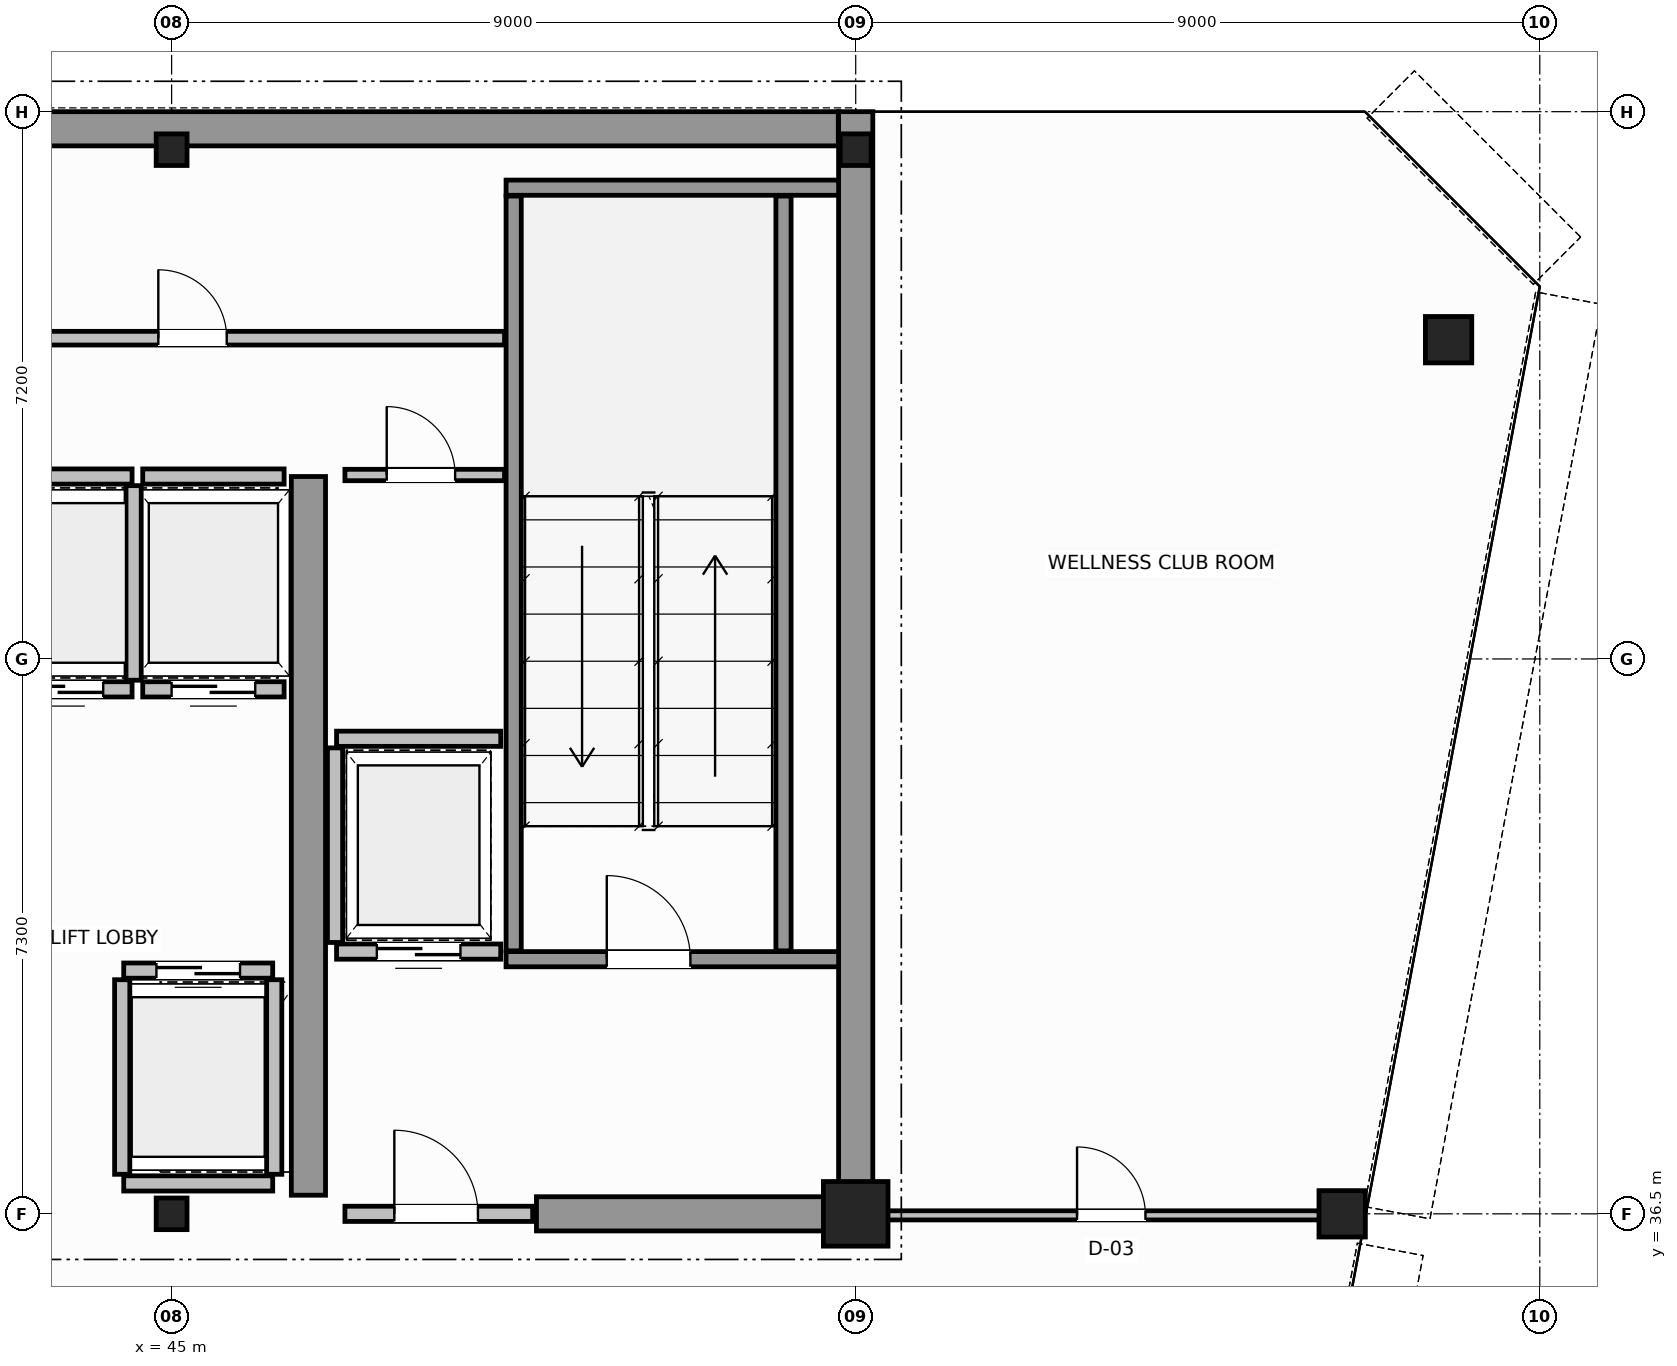
"""IFC4 building model, lengths in metres.
Left out: names, types, materials, properties, quantities, classifications, styles, units other than length and angle.
Written with IfcOpenShell. Run it as: python <this file> out.ifc"""

import sys

from ifc_helpers import new_model, si_unit, direction, frame, frame_2d, origin, origin_2d, place, context, subcontext, project, spatial, rectangle, hollow_circle, i_section, extrude, source, transform, mapped, element, fill, save


model = new_model("IFC4")
c1 = context("Model", 3, precision=1e-05, world=origin(), true_north=direction((0.0, 1.0)))
c2 = subcontext(c1, "Body", "Model", "MODEL_VIEW")
j1 = project(units=[si_unit("LENGTHUNIT", "METRE"), si_unit("PLANEANGLEUNIT", "RADIAN")], contexts=[c1])
p1 = place(None, origin())
s1 = spatial("IfcSite", under=j1, at=p1, CompositionType="ELEMENT")
p2 = place(p1, origin())
s2 = spatial("IfcBuilding", under=s1, at=p2, CompositionType="ELEMENT")
p3 = place(p2, frame((0.0, 0.0, 299.2)))
s3 = spatial("IfcBuildingStorey", under=s2, at=p3, CompositionType="ELEMENT", Elevation=299.2)
m1 = source(origin(), c2, "Body", "SweptSolid", [
    extrude(i_section(OverallWidth=0.406, OverallDepth=0.416, WebThickness=0.03, FlangeThickness=0.042, FilletRadius=0.015, at=origin_2d()), origin(), (0.0, 0.0, 1.0), 4.6),
])
p4 = place(p3, frame((45.0, 36.5, 0.0), z_axis=(0.0, 0.0, 1.0), x_axis=(1.0, 0.0, 0.0)))
e1 = element("IfcColumn", 1, at=p4, inside=s3, PredefinedType="COLUMN", context=c2, shape_type="MappedRepresentation", body=[
    mapped(m1, transform((0.0, 0.0, 0.0), scale=1.0)),
])
m2 = source(origin(), c2, "Body", "SweptSolid", [
    extrude(rectangle(XDim=0.85, YDim=0.85, at=origin_2d()), origin(), (0.0, 0.0, 1.0), 4.6),
])
p5 = place(p3, frame((54.0, 36.5, 0.0), z_axis=(0.0, 0.0, 1.0), x_axis=(1.0, 0.0, 0.0)))
e2 = element("IfcColumn", 2, at=p5, inside=s3, PredefinedType="COLUMN", context=c2, shape_type="MappedRepresentation", body=[
    mapped(m2, transform((0.0, 0.0, 0.0), scale=1.0)),
])
for number, where, z_axis, x_axis in (
    (3, (45.0, 50.5, 0.0), (0.0, 0.0, 1.0), (1.0, 0.0, 0.0)),
    (4, (54.0, 50.5, 0.0), (0.0, 0.0, 1.0), (1.0, 0.0, 0.0)),
):
    element("IfcColumn", number, at=place(p3, frame(where, z_axis=z_axis, x_axis=x_axis)), inside=s3, PredefinedType="COLUMN", context=c2, shape_type="MappedRepresentation", body=[
        mapped(m1, transform((0.0, 0.0, 0.0), scale=1.0)),
    ])
m3 = source(origin(), c2, "Body", "SweptSolid", [
    extrude(hollow_circle(Radius=0.305, WallThickness=0.03, at=origin_2d()), origin(), (0.0, 0.0, 1.0), 4.6),
])
for number, where, z_axis, x_axis in (
    (5, (61.8, 48.0, 0.0), (0.0, 0.0, 1.0), (1.0, 0.0, 0.0)),
    (6, (60.4, 36.5, 0.0), (0.0, 0.0, 1.0), (1.0, 0.0, 0.0)),
):
    element("IfcColumn", number, at=place(p3, frame(where, z_axis=z_axis, x_axis=x_axis)), inside=s3, PredefinedType="COLUMN", context=c2, shape_type="MappedRepresentation", body=[
        mapped(m3, transform((0.0, 0.0, 0.0), scale=1.0)),
    ])
p6 = place(p3, frame((34.002, 50.775, 0.0), z_axis=(0.0, 0.0, 1.0), x_axis=(1.0, 0.0, 0.0)))
e7 = element("IfcWall", 7, at=p6, inside=s3, PredefinedType="SHEAR", context=c2, shape_type="SweptSolid", body=[
    extrude(rectangle(XDim=19.769, YDim=0.45, at=frame_2d((9.885, 0.0))), origin(), (0.0, 0.0, 1.0), 4.6),
])
p7 = place(p3, frame((54.0, 36.5, 0.0), z_axis=(0.0, 0.0, 1.0), x_axis=(0.0, 1.0, 0.0)))
e8 = element("IfcWall", 8, at=p7, inside=s3, PredefinedType="SHEAR", context=c2, shape_type="SweptSolid", body=[
    extrude(rectangle(XDim=14.5, YDim=0.45, at=frame_2d((7.25, 0.0))), origin(), (0.0, 0.0, 1.0), 4.6),
])
p8 = place(p3, frame((49.8, 36.5, 0.0), z_axis=(0.0, 0.0, 1.0), x_axis=(1.0, 0.0, 0.0)))
e9 = element("IfcWall", 9, at=p8, inside=s3, PredefinedType="SHEAR", context=c2, shape_type="SweptSolid", body=[
    extrude(rectangle(XDim=3.955, YDim=0.45, at=frame_2d((1.978, 0.0))), origin(), (0.0, 0.0, 1.0), 3.3),
])
p9 = place(p3, frame((46.8, 36.745, 0.0), z_axis=(0.0, 0.0, 1.0), x_axis=(0.0, 1.0, 0.0)))
e10 = element("IfcWall", 10, at=p9, inside=s3, PredefinedType="SHEAR", context=c2, shape_type="SweptSolid", body=[
    extrude(rectangle(XDim=9.455, YDim=0.45, at=frame_2d((4.728, 0.0))), origin(), (0.0, 0.0, 1.0), 4.6),
])
p10 = place(p3, frame((49.4, 39.85, 0.0), z_axis=(0.0, 0.0, 1.0), x_axis=(1.0, 0.0, 0.0)))
e11 = element("IfcWall", 11, at=p10, inside=s3, PredefinedType="SOLIDWALL", context=c2, shape_type="SweptSolid", body=[
    extrude(rectangle(XDim=4.375, YDim=0.2, at=frame_2d((2.188, 0.0))), origin(), (0.0, 0.0, 1.0), 4.6),
])
p11 = place(p10, frame((1.325, 0.0, 0.0)))
e12 = element("IfcOpeningElement", 12, at=p11, cuts=e11, PredefinedType="OPENING", context=c2, shape_type="SweptSolid", body=[
    extrude(rectangle(XDim=1.1, YDim=2.15, at=frame_2d((0.55, 1.075))), frame((0.0, 0.11, 0.0), z_axis=(0.0, -1.0, 0.0), x_axis=(1.0, 0.0, 0.0)), (0.0, 0.0, 1.0), 0.22),
])
p12 = place(p3, frame((49.4, 50.0, 0.0), z_axis=(0.0, 0.0, 1.0), x_axis=(1.0, 0.0, 0.0)))
e13 = element("IfcWall", 13, at=p12, inside=s3, PredefinedType="SOLIDWALL", context=c2, shape_type="SweptSolid", body=[
    extrude(rectangle(XDim=4.375, YDim=0.2, at=frame_2d((2.188, 0.0))), origin(), (0.0, 0.0, 1.0), 4.6),
])
for number, where, z_axis, x_axis in (
    (14, (49.5, 39.96, 0.0), (0.0, 0.0, 1.0), (0.0, 1.0, 0.0)),
    (15, (53.05, 39.96, 0.0), (0.0, 0.0, 1.0), (0.0, 1.0, 0.0)),
):
    element("IfcWall", number, at=place(p3, frame(where, z_axis=z_axis, x_axis=x_axis)), inside=s3, PredefinedType="SOLIDWALL", context=c2, shape_type="SweptSolid", body=[
        extrude(rectangle(XDim=9.93, YDim=0.2, at=frame_2d((4.965, 0.0))), origin(), (0.0, 0.0, 1.0), 4.6),
    ])
p13 = place(p3, frame((47.28, 36.5, 0.0), z_axis=(0.0, 0.0, 1.0), x_axis=(1.0, 0.0, 0.0)))
e16 = element("IfcWall", 16, at=p13, inside=s3, PredefinedType="SOLIDWALL", context=c2, shape_type="SweptSolid", body=[
    extrude(rectangle(XDim=2.47, YDim=0.2, at=frame_2d((1.235, 0.0))), origin(), (0.0, 0.0, 1.0), 3.29),
])
p14 = place(p13, frame((0.65, 0.0, 0.0)))
e17 = element("IfcOpeningElement", 17, at=p14, cuts=e16, PredefinedType="OPENING", context=c2, shape_type="SweptSolid", body=[
    extrude(rectangle(XDim=1.1, YDim=2.15, at=frame_2d((0.55, 1.075))), frame((0.0, 0.11, 0.0), z_axis=(0.0, -1.0, 0.0), x_axis=(1.0, 0.0, 0.0)), (0.0, 0.0, 1.0), 0.22),
])
p15 = place(p3, frame((44.37, 39.7, 0.0), z_axis=(0.0, 0.0, 1.0), x_axis=(1.0, 0.0, 0.0)))
e18 = element("IfcWall", 18, at=p15, inside=s3, PredefinedType="SOLIDWALL", context=c2, shape_type="SweptSolid", body=[
    extrude(rectangle(XDim=1.96, YDim=0.2, at=frame_2d((0.98, 0.0))), origin(), (0.0, 0.0, 1.0), 4.3),
])
p16 = place(p15, frame((0.43, 0.0, 0.0)))
e19 = element("IfcOpeningElement", 19, at=p16, cuts=e18, PredefinedType="OPENING", context=c2, shape_type="SweptSolid", body=[
    extrude(rectangle(XDim=1.1, YDim=2.15, at=frame_2d((0.55, 1.075))), frame((0.0, 0.11, 0.0), z_axis=(0.0, -1.0, 0.0), x_axis=(1.0, 0.0, 0.0)), (0.0, 0.0, 1.0), 0.22),
])
p17 = place(p3, frame((44.37, 36.9, 0.0), z_axis=(0.0, 0.0, 1.0), x_axis=(1.0, 0.0, 0.0)))
e20 = element("IfcWall", 20, at=p17, inside=s3, PredefinedType="SOLIDWALL", context=c2, shape_type="SweptSolid", body=[
    extrude(rectangle(XDim=1.96, YDim=0.2, at=frame_2d((0.98, 0.0))), origin(), (0.0, 0.0, 1.0), 3.09),
])
for number, where, z_axis, x_axis in (
    (21, (44.35, 37.02, 0.0), (0.0, 0.0, 1.0), (0.0, 1.0, 0.0)),
    (22, (46.35, 37.02, 0.0), (0.0, 0.0, 1.0), (0.0, 1.0, 0.0)),
):
    element("IfcWall", number, at=place(p3, frame(where, z_axis=z_axis, x_axis=x_axis)), inside=s3, PredefinedType="SOLIDWALL", context=c2, shape_type="SweptSolid", body=[
        extrude(rectangle(XDim=2.56, YDim=0.2, at=frame_2d((1.28, 0.0))), origin(), (0.0, 0.0, 1.0), 4.3),
    ])
p18 = place(p3, frame((42.62, 43.4, 0.0), z_axis=(0.0, 0.0, 1.0), x_axis=(1.0, 0.0, 0.0)))
e23 = element("IfcWall", 23, at=p18, inside=s3, PredefinedType="SOLIDWALL", context=c2, shape_type="SweptSolid", body=[
    extrude(rectangle(XDim=1.86, YDim=0.2, at=frame_2d((0.93, 0.0))), origin(), (0.0, 0.0, 1.0), 4.3),
])
p19 = place(p18, frame((0.38, 0.0, 0.0)))
e24 = element("IfcOpeningElement", 24, at=p19, cuts=e23, PredefinedType="OPENING", context=c2, shape_type="SweptSolid", body=[
    extrude(rectangle(XDim=1.1, YDim=2.15, at=frame_2d((0.55, 1.075))), frame((0.0, 0.11, 0.0), z_axis=(0.0, -1.0, 0.0), x_axis=(1.0, 0.0, 0.0)), (0.0, 0.0, 1.0), 0.22),
])
p20 = place(p3, frame((42.62, 46.2, 0.0), z_axis=(0.0, 0.0, 1.0), x_axis=(1.0, 0.0, 0.0)))
e25 = element("IfcWall", 25, at=p20, inside=s3, PredefinedType="SOLIDWALL", context=c2, shape_type="SweptSolid", body=[
    extrude(rectangle(XDim=1.86, YDim=0.2, at=frame_2d((0.93, 0.0))), origin(), (0.0, 0.0, 1.0), 4.3),
])
p21 = place(p3, frame((44.5, 43.52, 0.0), z_axis=(0.0, 0.0, 1.0), x_axis=(0.0, 1.0, 0.0)))
e26 = element("IfcWall", 26, at=p21, inside=s3, PredefinedType="SOLIDWALL", context=c2, shape_type="SweptSolid", body=[
    extrude(rectangle(XDim=2.56, YDim=0.2, at=frame_2d((1.28, 0.0))), origin(), (0.0, 0.0, 1.0), 3.09),
])
p22 = place(p3, frame((44.62, 43.4, 0.0), z_axis=(0.0, 0.0, 1.0), x_axis=(1.0, 0.0, 0.0)))
e27 = element("IfcWall", 27, at=p22, inside=s3, PredefinedType="SOLIDWALL", context=c2, shape_type="SweptSolid", body=[
    extrude(rectangle(XDim=1.86, YDim=0.2, at=frame_2d((0.93, 0.0))), origin(), (0.0, 0.0, 1.0), 4.3),
])
p23 = place(p22, frame((0.38, 0.0, 0.0)))
e28 = element("IfcOpeningElement", 28, at=p23, cuts=e27, PredefinedType="OPENING", context=c2, shape_type="SweptSolid", body=[
    extrude(rectangle(XDim=1.1, YDim=2.15, at=frame_2d((0.55, 1.075))), frame((0.0, 0.11, 0.0), z_axis=(0.0, -1.0, 0.0), x_axis=(1.0, 0.0, 0.0)), (0.0, 0.0, 1.0), 0.22),
])
p24 = place(p3, frame((44.62, 46.2, 0.0), z_axis=(0.0, 0.0, 1.0), x_axis=(1.0, 0.0, 0.0)))
e29 = element("IfcWall", 29, at=p24, inside=s3, PredefinedType="SOLIDWALL", context=c2, shape_type="SweptSolid", body=[
    extrude(rectangle(XDim=1.86, YDim=0.2, at=frame_2d((0.93, 0.0))), origin(), (0.0, 0.0, 1.0), 4.3),
])
p25 = place(p3, frame((47.17, 39.95, 0.0), z_axis=(0.0, 0.0, 1.0), x_axis=(1.0, 0.0, 0.0)))
e30 = element("IfcWall", 30, at=p25, inside=s3, PredefinedType="SOLIDWALL", context=c2, shape_type="SweptSolid", body=[
    extrude(rectangle(XDim=2.16, YDim=0.2, at=frame_2d((1.08, 0.0))), origin(), (0.0, 0.0, 1.0), 4.3),
])
p26 = place(p25, frame((0.53, 0.0, 0.0)))
e31 = element("IfcOpeningElement", 31, at=p26, cuts=e30, PredefinedType="OPENING", context=c2, shape_type="SweptSolid", body=[
    extrude(rectangle(XDim=1.1, YDim=2.15, at=frame_2d((0.55, 1.075))), frame((0.0, 0.11, 0.0), z_axis=(0.0, -1.0, 0.0), x_axis=(1.0, 0.0, 0.0)), (0.0, 0.0, 1.0), 0.22),
])
p27 = place(p3, frame((47.17, 42.75, 0.0), z_axis=(0.0, 0.0, 1.0), x_axis=(1.0, 0.0, 0.0)))
e32 = element("IfcWall", 32, at=p27, inside=s3, PredefinedType="SOLIDWALL", context=c2, shape_type="SweptSolid", body=[
    extrude(rectangle(XDim=2.16, YDim=0.2, at=frame_2d((1.08, 0.0))), origin(), (0.0, 0.0, 1.0), 4.3),
])
p28 = place(p3, frame((47.15, 40.07, 0.0), z_axis=(0.0, 0.0, 1.0), x_axis=(0.0, 1.0, 0.0)))
e33 = element("IfcWall", 33, at=p28, inside=s3, PredefinedType="SOLIDWALL", context=c2, shape_type="SweptSolid", body=[
    extrude(rectangle(XDim=2.56, YDim=0.2, at=frame_2d((1.28, 0.0))), origin(), (0.0, 0.0, 1.0), 4.3),
])
p29 = place(p3, frame((47.28, 46.22, 0.0), z_axis=(0.0, 0.0, 1.0), x_axis=(1.0, 0.0, 0.0)))
e34 = element("IfcWall", 34, at=p29, inside=s3, PredefinedType="PARTITIONING", context=c2, shape_type="SweptSolid", body=[
    extrude(rectangle(XDim=2.1, YDim=0.15, at=frame_2d((1.05, 0.0))), origin(), (0.0, 0.0, 1.0), 4.3),
])
p30 = place(p29, frame((0.55, 0.0, 0.0)))
e35 = element("IfcOpeningElement", 35, at=p30, cuts=e34, PredefinedType="OPENING", context=c2, shape_type="SweptSolid", body=[
    extrude(rectangle(XDim=0.9, YDim=2.1, at=frame_2d((0.45, 1.05))), frame((0.0, 0.085, 0.0), z_axis=(0.0, -1.0, 0.0), x_axis=(1.0, 0.0, 0.0)), (0.0, 0.0, 1.0), 0.17),
])
p31 = place(p3, frame((18.62, 48.02, 0.0), z_axis=(0.0, 0.0, 1.0), x_axis=(1.0, 0.0, 0.0)))
e36 = element("IfcWall", 36, at=p31, inside=s3, PredefinedType="PLUMBINGWALL", context=c2, shape_type="SweptSolid", body=[
    extrude(rectangle(XDim=30.76, YDim=0.18, at=frame_2d((15.38, 0.0))), origin(), (0.0, 0.0, 1.0), 4.3),
])
p32 = place(p31, frame((1.955, 0.0, 0.0)))
e37 = element("IfcOpeningElement", 37, at=p32, cuts=e36, PredefinedType="OPENING", context=c2, shape_type="SweptSolid", body=[
    extrude(rectangle(XDim=0.9, YDim=2.15, at=frame_2d((0.45, 1.075))), frame((0.0, 0.1, 0.0), z_axis=(0.0, -1.0, 0.0), x_axis=(1.0, 0.0, 0.0)), (0.0, 0.0, 1.0), 0.2),
])
p33 = place(p31, frame((8.03, 0.0, 0.0)))
e38 = element("IfcOpeningElement", 38, at=p33, cuts=e36, PredefinedType="OPENING", context=c2, shape_type="SweptSolid", body=[
    extrude(rectangle(XDim=0.9, YDim=2.15, at=frame_2d((0.45, 1.075))), frame((0.0, 0.1, 0.0), z_axis=(0.0, -1.0, 0.0), x_axis=(1.0, 0.0, 0.0)), (0.0, 0.0, 1.0), 0.2),
])
p34 = place(p31, frame((16.93, 0.0, 0.0)))
e39 = element("IfcOpeningElement", 39, at=p34, cuts=e36, PredefinedType="OPENING", context=c2, shape_type="SweptSolid", body=[
    extrude(rectangle(XDim=0.9, YDim=2.15, at=frame_2d((0.45, 1.075))), frame((0.0, 0.1, 0.0), z_axis=(0.0, -1.0, 0.0), x_axis=(1.0, 0.0, 0.0)), (0.0, 0.0, 1.0), 0.2),
])
p35 = place(p31, frame((26.205, 0.0, 0.0)))
e40 = element("IfcOpeningElement", 40, at=p35, cuts=e36, PredefinedType="OPENING", context=c2, shape_type="SweptSolid", body=[
    extrude(rectangle(XDim=0.9, YDim=2.15, at=frame_2d((0.45, 1.075))), frame((0.0, 0.1, 0.0), z_axis=(0.0, -1.0, 0.0), x_axis=(1.0, 0.0, 0.0)), (0.0, 0.0, 1.0), 0.2),
])
p36 = place(p3, frame((54.06, 36.48, 0.0), z_axis=(0.0, 0.0, 1.0), x_axis=(1.0, 0.0, 0.0)))
e41 = element("IfcWall", 41, at=p36, inside=s3, PredefinedType="PARTITIONING", context=c2, shape_type="SweptSolid", body=[
    extrude(rectangle(XDim=6.604, YDim=0.12, at=frame_2d((3.302, 0.0))), origin(), (0.0, 0.0, 1.0), 3.09),
])
p37 = place(p36, frame((2.852, 0.0, 0.0)))
e42 = element("IfcOpeningElement", 42, at=p37, cuts=e41, PredefinedType="OPENING", context=c2, shape_type="SweptSolid", body=[
    extrude(rectangle(XDim=0.9, YDim=2.15, at=frame_2d((0.45, 1.075))), frame((0.0, 0.07, 0.0), z_axis=(0.0, -1.0, 0.0), x_axis=(1.0, 0.0, 0.0)), (0.0, 0.0, 1.0), 0.14),
])
m4 = source(origin(), c2, "Body", "SweptSolid", [
    extrude(rectangle(XDim=1.1, YDim=2.15, at=frame_2d((0.55, 1.075))), frame((0.0, 0.025, 0.0), z_axis=(0.0, -1.0, 0.0), x_axis=(1.0, 0.0, 0.0)), (0.0, 0.0, 1.0), 0.05),
])
p38 = place(p11, origin())
e43 = element("IfcDoor", 43, at=p38, inside=s3, OperationType="SINGLE_SWING_RIGHT", PredefinedType="DOOR", context=c2, shape_type="MappedRepresentation", body=[
    mapped(m4, transform((0.0, 0.0, 0.0), scale=1.0)),
])
fill(e12, e43)
p39 = place(p14, origin())
e44 = element("IfcDoor", 44, at=p39, inside=s3, OperationType="SINGLE_SWING_LEFT", PredefinedType="DOOR", context=c2, shape_type="MappedRepresentation", body=[
    mapped(m4, transform((0.0, 0.0, 0.0), scale=1.0)),
])
fill(e17, e44)
p40 = place(p16, origin())
e45 = element("IfcDoor", 45, at=p40, inside=s3, OperationType="DOUBLE_DOOR_SLIDING", PredefinedType="DOOR", context=c2, shape_type="MappedRepresentation", body=[
    mapped(m4, transform((0.0, 0.0, 0.0), scale=1.0)),
])
fill(e19, e45)
p41 = place(p19, origin())
e46 = element("IfcDoor", 46, at=p41, inside=s3, OperationType="DOUBLE_DOOR_SLIDING", PredefinedType="DOOR", context=c2, shape_type="MappedRepresentation", body=[
    mapped(m4, transform((0.0, 0.0, 0.0), scale=1.0)),
])
fill(e24, e46)
p42 = place(p23, origin())
e47 = element("IfcDoor", 47, at=p42, inside=s3, OperationType="DOUBLE_DOOR_SLIDING", PredefinedType="DOOR", context=c2, shape_type="MappedRepresentation", body=[
    mapped(m4, transform((0.0, 0.0, 0.0), scale=1.0)),
])
fill(e28, e47)
p43 = place(p26, origin())
e48 = element("IfcDoor", 48, at=p43, inside=s3, OperationType="DOUBLE_DOOR_SLIDING", PredefinedType="DOOR", context=c2, shape_type="MappedRepresentation", body=[
    mapped(m4, transform((0.0, 0.0, 0.0), scale=1.0)),
])
fill(e31, e48)
m5 = source(origin(), c2, "Body", "SweptSolid", [
    extrude(rectangle(XDim=0.9, YDim=2.1, at=frame_2d((0.45, 1.05))), frame((0.0, 0.025, 0.0), z_axis=(0.0, -1.0, 0.0), x_axis=(1.0, 0.0, 0.0)), (0.0, 0.0, 1.0), 0.05),
])
p44 = place(p30, origin())
e49 = element("IfcDoor", 49, at=p44, inside=s3, OperationType="SINGLE_SWING_RIGHT", PredefinedType="DOOR", context=c2, shape_type="MappedRepresentation", body=[
    mapped(m5, transform((0.0, 0.0, 0.0), scale=1.0)),
])
fill(e35, e49)
m6 = source(origin(), c2, "Body", "SweptSolid", [
    extrude(rectangle(XDim=0.9, YDim=2.15, at=frame_2d((0.45, 1.075))), frame((0.0, 0.025, 0.0), z_axis=(0.0, -1.0, 0.0), x_axis=(1.0, 0.0, 0.0)), (0.0, 0.0, 1.0), 0.05),
])
p45 = place(p35, origin())
e50 = element("IfcDoor", 50, at=p45, inside=s3, OperationType="SINGLE_SWING_RIGHT", PredefinedType="DOOR", context=c2, shape_type="MappedRepresentation", body=[
    mapped(m6, transform((0.0, 0.0, 0.0), scale=1.0)),
])
fill(e40, e50)
p46 = place(p37, origin())
e51 = element("IfcDoor", 51, at=p46, inside=s3, OperationType="SINGLE_SWING_RIGHT", PredefinedType="DOOR", context=c2, shape_type="MappedRepresentation", body=[
    mapped(m6, transform((0.0, 0.0, 0.0), scale=1.0)),
])
fill(e42, e51)
save(model, sys.argv[1])
